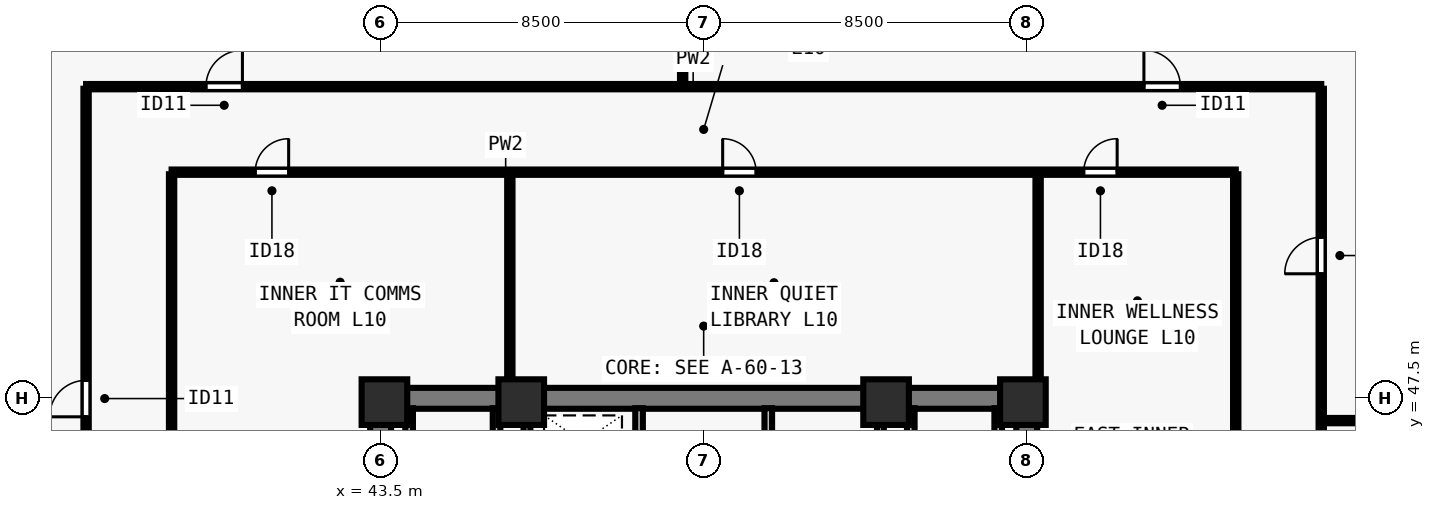
"""IFC4 building model, lengths in metres.
Left out: names, types, materials, properties, quantities, classifications, styles, units other than length and angle.
Written with IfcOpenShell. Run it as: python <this file> out.ifc"""

import sys

from ifc_helpers import new_model, si_unit, direction, frame, frame_2d, origin, origin_2d, place, context, subcontext, project, spatial, rectangle, extrude, element, fill, save


model = new_model("IFC4")
c1 = context("Model", 3, precision=1e-05, world=origin(), true_north=direction((0.0, 1.0)))
c2 = subcontext(c1, "Body", "Model", "MODEL_VIEW")
j1 = project(units=[si_unit("LENGTHUNIT", "METRE"), si_unit("PLANEANGLEUNIT", "RADIAN")], contexts=[c1])
p1 = place(None, origin())
s1 = spatial("IfcSite", under=j1, at=p1, CompositionType="ELEMENT")
p2 = place(p1, origin())
s2 = spatial("IfcBuilding", under=s1, at=p2, CompositionType="ELEMENT")
p3 = place(p2, frame((0.0, 0.0, 41.0)))
s3 = spatial("IfcBuildingStorey", under=s2, at=p3, CompositionType="ELEMENT", Elevation=41.0)
for number, where, z_axis, x_axis in (
    (1, (43.6, 47.4, 0.0), (0.0, 0.0, 1.0), (1.0, 0.0, 0.0)),
    (2, (47.2, 47.4, 0.0), (0.0, 0.0, 1.0), (1.0, 0.0, 0.0)),
    (3, (56.8, 47.4, 0.0), (0.0, 0.0, 1.0), (1.0, 0.0, 0.0)),
    (4, (60.4, 47.4, 0.0), (0.0, 0.0, 1.0), (1.0, 0.0, 0.0)),
):
    element("IfcColumn", number, at=place(p3, frame(where, z_axis=z_axis, x_axis=x_axis)), inside=s3, PredefinedType="COLUMN", context=c2, shape_type="SweptSolid", body=[
        extrude(rectangle(XDim=1.2, YDim=1.2, at=origin_2d()), origin(), (0.0, 0.0, 1.0), 3.5),
    ])
p4 = place(p3, frame((43.225, 47.5, 0.0), z_axis=(0.0, 0.0, 1.0), x_axis=(1.0, 0.0, 0.0)))
e5 = element("IfcWall", 5, at=p4, inside=s3, PredefinedType="SHEAR", context=c2, shape_type="SweptSolid", body=[
    extrude(rectangle(XDim=17.55, YDim=0.55, at=frame_2d((8.775, 0.0))), origin(), (0.0, 0.0, 1.0), 3.28),
])
for number, where, z_axis, x_axis in (
    (6, (43.5, 40.8, 0.0), (0.0, 0.0, 1.0), (0.0, 1.0, 0.0)),
    (7, (60.5, 40.8, 0.0), (0.0, 0.0, 1.0), (0.0, 1.0, 0.0)),
):
    element("IfcWall", number, at=place(p3, frame(where, z_axis=z_axis, x_axis=x_axis)), inside=s3, PredefinedType="SHEAR", context=c2, shape_type="SweptSolid", body=[
        extrude(rectangle(XDim=6.435, YDim=0.55, at=frame_2d((3.218, 0.0))), origin(), (0.0, 0.0, 1.0), 3.28),
    ])
p5 = place(p3, frame((50.3, 40.585, 0.0), z_axis=(0.0, 0.0, 1.0), x_axis=(0.0, 1.0, 0.0)))
e8 = element("IfcWall", 8, at=p5, inside=s3, PredefinedType="SOLIDWALL", context=c2, shape_type="SweptSolid", body=[
    extrude(rectangle(XDim=6.655, YDim=0.2, at=frame_2d((3.328, 0.0))), origin(), (0.0, 0.0, 1.0), 3.28),
])
p6 = place(p5, frame((5.065, 0.0, 0.0)))
e9 = element("IfcOpeningElement", 9, at=p6, cuts=e8, PredefinedType="OPENING", context=c2, shape_type="SweptSolid", body=[
    extrude(rectangle(XDim=0.8, YDim=2.08, at=frame_2d((0.4, 1.04))), frame((0.0, 0.11, 0.0), z_axis=(0.0, -1.0, 0.0), x_axis=(1.0, 0.0, 0.0)), (0.0, 0.0, 1.0), 0.22),
])
p7 = place(p3, frame((53.7, 40.585, 0.0), z_axis=(0.0, 0.0, 1.0), x_axis=(0.0, 1.0, 0.0)))
e10 = element("IfcWall", 10, at=p7, inside=s3, PredefinedType="SOLIDWALL", context=c2, shape_type="SweptSolid", body=[
    extrude(rectangle(XDim=6.655, YDim=0.2, at=frame_2d((3.328, 0.0))), origin(), (0.0, 0.0, 1.0), 3.28),
])
p8 = place(p7, frame((0.195, 0.0, 0.0)))
e11 = element("IfcOpeningElement", 11, at=p8, cuts=e10, PredefinedType="OPENING", context=c2, shape_type="SweptSolid", body=[
    extrude(rectangle(XDim=0.8, YDim=2.08, at=frame_2d((0.4, 1.04))), frame((0.0, 0.11, 0.0), z_axis=(0.0, -1.0, 0.0), x_axis=(1.0, 0.0, 0.0)), (0.0, 0.0, 1.0), 0.22),
])
p9 = place(p7, frame((4.265, 0.0, 0.0)))
e12 = element("IfcOpeningElement", 12, at=p9, cuts=e10, PredefinedType="OPENING", context=c2, shape_type="SweptSolid", body=[
    extrude(rectangle(XDim=0.95, YDim=2.12, at=frame_2d((0.475, 1.06))), frame((0.0, 0.11, 0.0), z_axis=(0.0, -1.0, 0.0), x_axis=(1.0, 0.0, 0.0)), (0.0, 0.0, 1.0), 0.22),
])
for number, where, z_axis, x_axis in (
    (13, (46.55, 43.735, 0.0), (0.0, 0.0, 1.0), (0.0, 1.0, 0.0)),
    (14, (44.25, 43.735, 0.0), (0.0, 0.0, 1.0), (0.0, 1.0, 0.0)),
    (15, (57.45, 43.735, 0.0), (0.0, 0.0, 1.0), (0.0, 1.0, 0.0)),
    (16, (59.75, 43.735, 0.0), (0.0, 0.0, 1.0), (0.0, 1.0, 0.0)),
):
    element("IfcWall", number, at=place(p3, frame(where, z_axis=z_axis, x_axis=x_axis)), inside=s3, PredefinedType="SOLIDWALL", context=c2, shape_type="SweptSolid", body=[
        extrude(rectangle(XDim=3.505, YDim=0.2, at=frame_2d((1.752, 0.0))), origin(), (0.0, 0.0, 1.0), 3.28),
    ])
for number, where, z_axis, x_axis in (
    (17, (47.35, 43.735, 0.0), (0.0, 0.0, 1.0), (0.0, 1.0, 0.0)),
    (18, (56.65, 43.735, 0.0), (0.0, 0.0, 1.0), (0.0, 1.0, 0.0)),
):
    element("IfcWall", number, at=place(p3, frame(where, z_axis=z_axis, x_axis=x_axis)), inside=s3, PredefinedType="SOLIDWALL", context=c2, shape_type="SweptSolid", body=[
        extrude(rectangle(XDim=3.505, YDim=0.18, at=frame_2d((1.752, 0.0))), origin(), (0.0, 0.0, 1.0), 3.28),
    ])
p10 = place(p3, frame((35.75, 55.7, 0.0), z_axis=(0.0, 0.0, 1.0), x_axis=(1.0, 0.0, 0.0)))
e19 = element("IfcWall", 19, at=p10, inside=s3, PredefinedType="PARTITIONING", context=c2, shape_type="SweptSolid", body=[
    extrude(rectangle(XDim=32.5, YDim=0.14, at=frame_2d((16.25, 0.0))), origin(), (0.0, 0.0, 1.0), 3.28),
])
p11 = place(p10, frame((3.154, 0.0, 0.0)))
e20 = element("IfcOpeningElement", 20, at=p11, cuts=e19, PredefinedType="OPENING", context=c2, shape_type="SweptSolid", body=[
    extrude(rectangle(XDim=0.96, YDim=2.12, at=frame_2d((0.48, 1.06))), frame((0.0, 0.08, 0.0), z_axis=(0.0, -1.0, 0.0), x_axis=(1.0, 0.0, 0.0)), (0.0, 0.0, 1.0), 0.16),
])
p12 = place(p10, frame((27.834, 0.0, 0.0)))
e21 = element("IfcOpeningElement", 21, at=p12, cuts=e19, PredefinedType="OPENING", context=c2, shape_type="SweptSolid", body=[
    extrude(rectangle(XDim=0.96, YDim=2.12, at=frame_2d((0.48, 1.06))), frame((0.0, 0.08, 0.0), z_axis=(0.0, -1.0, 0.0), x_axis=(1.0, 0.0, 0.0)), (0.0, 0.0, 1.0), 0.16),
])
p13 = place(p3, frame((35.75, 22.355, 0.0), z_axis=(0.0, 0.0, 1.0), x_axis=(0.0, 1.0, 0.0)))
e22 = element("IfcWall", 22, at=p13, inside=s3, PredefinedType="PARTITIONING", context=c2, shape_type="SweptSolid", body=[
    extrude(rectangle(XDim=33.29, YDim=0.14, at=frame_2d((16.645, 0.0))), origin(), (0.0, 0.0, 1.0), 3.28),
])
p14 = place(p13, frame((8.058, 0.0, 0.0)))
e23 = element("IfcOpeningElement", 23, at=p14, cuts=e22, PredefinedType="OPENING", context=c2, shape_type="SweptSolid", body=[
    extrude(rectangle(XDim=0.96, YDim=2.12, at=frame_2d((0.48, 1.06))), frame((0.0, 0.08, 0.0), z_axis=(0.0, -1.0, 0.0), x_axis=(1.0, 0.0, 0.0)), (0.0, 0.0, 1.0), 0.16),
])
p15 = place(p13, frame((24.658, 0.0, 0.0)))
e24 = element("IfcOpeningElement", 24, at=p15, cuts=e22, PredefinedType="OPENING", context=c2, shape_type="SweptSolid", body=[
    extrude(rectangle(XDim=0.96, YDim=2.12, at=frame_2d((0.48, 1.06))), frame((0.0, 0.08, 0.0), z_axis=(0.0, -1.0, 0.0), x_axis=(1.0, 0.0, 0.0)), (0.0, 0.0, 1.0), 0.16),
])
p16 = place(p3, frame((68.25, 22.355, 0.0), z_axis=(0.0, 0.0, 1.0), x_axis=(0.0, 1.0, 0.0)))
e25 = element("IfcWall", 25, at=p16, inside=s3, PredefinedType="PARTITIONING", context=c2, shape_type="SweptSolid", body=[
    extrude(rectangle(XDim=33.29, YDim=0.14, at=frame_2d((16.645, 0.0))), origin(), (0.0, 0.0, 1.0), 3.28),
])
p17 = place(p16, frame((3.522, 0.0, 0.0)))
e26 = element("IfcOpeningElement", 26, at=p17, cuts=e25, PredefinedType="OPENING", context=c2, shape_type="SweptSolid", body=[
    extrude(rectangle(XDim=0.96, YDim=2.12, at=frame_2d((0.48, 1.06))), frame((0.0, 0.08, 0.0), z_axis=(0.0, -1.0, 0.0), x_axis=(1.0, 0.0, 0.0)), (0.0, 0.0, 1.0), 0.16),
])
p18 = place(p16, frame((11.956, 0.0, 0.0)))
e27 = element("IfcOpeningElement", 27, at=p18, cuts=e25, PredefinedType="OPENING", context=c2, shape_type="SweptSolid", body=[
    extrude(rectangle(XDim=0.96, YDim=2.12, at=frame_2d((0.48, 1.06))), frame((0.0, 0.08, 0.0), z_axis=(0.0, -1.0, 0.0), x_axis=(1.0, 0.0, 0.0)), (0.0, 0.0, 1.0), 0.16),
])
p19 = place(p16, frame((20.256, 0.0, 0.0)))
e28 = element("IfcOpeningElement", 28, at=p19, cuts=e25, PredefinedType="OPENING", context=c2, shape_type="SweptSolid", body=[
    extrude(rectangle(XDim=0.96, YDim=2.12, at=frame_2d((0.48, 1.06))), frame((0.0, 0.08, 0.0), z_axis=(0.0, -1.0, 0.0), x_axis=(1.0, 0.0, 0.0)), (0.0, 0.0, 1.0), 0.16),
])
p20 = place(p16, frame((28.422, 0.0, 0.0)))
e29 = element("IfcOpeningElement", 29, at=p20, cuts=e25, PredefinedType="OPENING", context=c2, shape_type="SweptSolid", body=[
    extrude(rectangle(XDim=0.96, YDim=2.12, at=frame_2d((0.48, 1.06))), frame((0.0, 0.08, 0.0), z_axis=(0.0, -1.0, 0.0), x_axis=(1.0, 0.0, 0.0)), (0.0, 0.0, 1.0), 0.16),
])
p21 = place(p3, frame((38.0, 53.45, 0.0), z_axis=(0.0, 0.0, 1.0), x_axis=(1.0, 0.0, 0.0)))
e30 = element("IfcWall", 30, at=p21, inside=s3, PredefinedType="PARTITIONING", context=c2, shape_type="SweptSolid", body=[
    extrude(rectangle(XDim=28.0, YDim=0.14, at=frame_2d((14.0, 0.0))), origin(), (0.0, 0.0, 1.0), 3.28),
])
p22 = place(p21, frame((2.2, 0.0, 0.0)))
e31 = element("IfcOpeningElement", 31, at=p22, cuts=e30, PredefinedType="OPENING", context=c2, shape_type="SweptSolid", body=[
    extrude(rectangle(XDim=0.88, YDim=2.1, at=frame_2d((0.44, 1.05))), frame((0.0, 0.08, 0.0), z_axis=(0.0, -1.0, 0.0), x_axis=(1.0, 0.0, 0.0)), (0.0, 0.0, 1.0), 0.16),
])
p23 = place(p21, frame((14.5, 0.0, 0.0)))
e32 = element("IfcOpeningElement", 32, at=p23, cuts=e30, PredefinedType="OPENING", context=c2, shape_type="SweptSolid", body=[
    extrude(rectangle(XDim=0.88, YDim=2.1, at=frame_2d((0.44, 1.05))), frame((0.0, 0.08, 0.0), z_axis=(0.0, -1.0, 0.0), x_axis=(1.0, 0.0, 0.0)), (0.0, 0.0, 1.0), 0.16),
])
p24 = place(p21, frame((24.0, 0.0, 0.0)))
e33 = element("IfcOpeningElement", 33, at=p24, cuts=e30, PredefinedType="OPENING", context=c2, shape_type="SweptSolid", body=[
    extrude(rectangle(XDim=0.88, YDim=2.1, at=frame_2d((0.44, 1.05))), frame((0.0, 0.08, 0.0), z_axis=(0.0, -1.0, 0.0), x_axis=(1.0, 0.0, 0.0)), (0.0, 0.0, 1.0), 0.16),
])
p25 = place(p3, frame((38.0, 40.8, 0.0), z_axis=(0.0, 0.0, 1.0), x_axis=(0.0, 1.0, 0.0)))
e34 = element("IfcWall", 34, at=p25, inside=s3, PredefinedType="PARTITIONING", context=c2, shape_type="SweptSolid", body=[
    extrude(rectangle(XDim=12.595, YDim=0.14, at=frame_2d((6.297, 0.0))), origin(), (0.0, 0.0, 1.0), 3.28),
])
p26 = place(p25, frame((2.5, 0.0, 0.0)))
e35 = element("IfcOpeningElement", 35, at=p26, cuts=e34, PredefinedType="OPENING", context=c2, shape_type="SweptSolid", body=[
    extrude(rectangle(XDim=0.88, YDim=2.1, at=frame_2d((0.44, 1.05))), frame((0.0, 0.08, 0.0), z_axis=(0.0, -1.0, 0.0), x_axis=(1.0, 0.0, 0.0)), (0.0, 0.0, 1.0), 0.16),
])
p27 = place(p3, frame((66.0, 40.8, 0.0), z_axis=(0.0, 0.0, 1.0), x_axis=(0.0, 1.0, 0.0)))
e36 = element("IfcWall", 36, at=p27, inside=s3, PredefinedType="PARTITIONING", context=c2, shape_type="SweptSolid", body=[
    extrude(rectangle(XDim=12.595, YDim=0.14, at=frame_2d((6.297, 0.0))), origin(), (0.0, 0.0, 1.0), 3.28),
])
p28 = place(p27, frame((2.5, 0.0, 0.0)))
e37 = element("IfcOpeningElement", 37, at=p28, cuts=e36, PredefinedType="OPENING", context=c2, shape_type="SweptSolid", body=[
    extrude(rectangle(XDim=0.88, YDim=2.1, at=frame_2d((0.44, 1.05))), frame((0.0, 0.08, 0.0), z_axis=(0.0, -1.0, 0.0), x_axis=(1.0, 0.0, 0.0)), (0.0, 0.0, 1.0), 0.16),
])
p29 = place(p3, frame((46.9, 47.76, 0.0), z_axis=(0.0, 0.0, 1.0), x_axis=(0.0, 1.0, 0.0)))
e38 = element("IfcWall", 38, at=p29, inside=s3, PredefinedType="PARTITIONING", context=c2, shape_type="SweptSolid", body=[
    extrude(rectangle(XDim=5.635, YDim=0.14, at=frame_2d((2.817, 0.0))), origin(), (0.0, 0.0, 1.0), 3.28),
])
p30 = place(p3, frame((60.8, 47.76, 0.0), z_axis=(0.0, 0.0, 1.0), x_axis=(0.0, 1.0, 0.0)))
e39 = element("IfcWall", 39, at=p30, inside=s3, PredefinedType="PARTITIONING", context=c2, shape_type="SweptSolid", body=[
    extrude(rectangle(XDim=5.635, YDim=0.14, at=frame_2d((2.817, 0.0))), origin(), (0.0, 0.0, 1.0), 2.439),
])
p31 = place(p3, frame((51.448, 55.8, 0.0), z_axis=(0.0, 0.0, 1.0), x_axis=(0.0, 1.0, 0.0)))
e40 = element("IfcWall", 40, at=p31, inside=s3, PredefinedType="PARTITIONING", context=c2, shape_type="SweptSolid", body=[
    extrude(rectangle(XDim=8.28, YDim=0.14, at=frame_2d((4.14, 0.0))), origin(), (0.0, 0.0, 1.0), 3.28),
])
p32 = place(p3, frame((68.35, 46.913, 0.0), z_axis=(0.0, 0.0, 1.0), x_axis=(1.0, 0.0, 0.0)))
e41 = element("IfcWall", 41, at=p32, inside=s3, PredefinedType="PARTITIONING", context=c2, shape_type="SweptSolid", body=[
    extrude(rectangle(XDim=8.73, YDim=0.14, at=frame_2d((4.365, 0.0))), origin(), (0.0, 0.0, 1.0), 3.28),
])
p33 = place(p22, origin())
e42 = element("IfcDoor", 42, at=p33, inside=s3, OperationType="SINGLE_SWING_RIGHT", PredefinedType="DOOR", context=c2, shape_type="SweptSolid", body=[
    extrude(rectangle(XDim=0.88, YDim=2.1, at=frame_2d((0.44, 1.05))), frame((0.0, 0.025, 0.0), z_axis=(0.0, -1.0, 0.0), x_axis=(1.0, 0.0, 0.0)), (0.0, 0.0, 1.0), 0.05),
])
fill(e31, e42)
p34 = place(p23, origin())
e43 = element("IfcDoor", 43, at=p34, inside=s3, OperationType="SINGLE_SWING_LEFT", PredefinedType="DOOR", context=c2, shape_type="SweptSolid", body=[
    extrude(rectangle(XDim=0.88, YDim=2.1, at=frame_2d((0.44, 1.05))), frame((0.0, 0.025, 0.0), z_axis=(0.0, -1.0, 0.0), x_axis=(1.0, 0.0, 0.0)), (0.0, 0.0, 1.0), 0.05),
])
fill(e32, e43)
p35 = place(p24, origin())
e44 = element("IfcDoor", 44, at=p35, inside=s3, OperationType="SINGLE_SWING_RIGHT", PredefinedType="DOOR", context=c2, shape_type="SweptSolid", body=[
    extrude(rectangle(XDim=0.88, YDim=2.1, at=frame_2d((0.44, 1.05))), frame((0.0, 0.025, 0.0), z_axis=(0.0, -1.0, 0.0), x_axis=(1.0, 0.0, 0.0)), (0.0, 0.0, 1.0), 0.05),
])
fill(e33, e44)
p36 = place(p11, origin())
e45 = element("IfcDoor", 45, at=p36, inside=s3, OperationType="SINGLE_SWING_RIGHT", PredefinedType="DOOR", context=c2, shape_type="SweptSolid", body=[
    extrude(rectangle(XDim=0.96, YDim=2.12, at=frame_2d((0.48, 1.06))), frame((0.0, 0.025, 0.0), z_axis=(0.0, -1.0, 0.0), x_axis=(1.0, 0.0, 0.0)), (0.0, 0.0, 1.0), 0.05),
])
fill(e20, e45)
p37 = place(p12, origin())
e46 = element("IfcDoor", 46, at=p37, inside=s3, OperationType="SINGLE_SWING_LEFT", PredefinedType="DOOR", context=c2, shape_type="SweptSolid", body=[
    extrude(rectangle(XDim=0.96, YDim=2.12, at=frame_2d((0.48, 1.06))), frame((0.0, 0.025, 0.0), z_axis=(0.0, -1.0, 0.0), x_axis=(1.0, 0.0, 0.0)), (0.0, 0.0, 1.0), 0.05),
])
fill(e21, e46)
p38 = place(p15, origin())
e47 = element("IfcDoor", 47, at=p38, inside=s3, OperationType="SINGLE_SWING_LEFT", PredefinedType="DOOR", context=c2, shape_type="SweptSolid", body=[
    extrude(rectangle(XDim=0.96, YDim=2.12, at=frame_2d((0.48, 1.06))), frame((0.0, 0.025, 0.0), z_axis=(0.0, -1.0, 0.0), x_axis=(1.0, 0.0, 0.0)), (0.0, 0.0, 1.0), 0.05),
])
fill(e24, e47)
p39 = place(p20, origin())
e48 = element("IfcDoor", 48, at=p39, inside=s3, OperationType="SINGLE_SWING_LEFT", PredefinedType="DOOR", context=c2, shape_type="SweptSolid", body=[
    extrude(rectangle(XDim=0.96, YDim=2.12, at=frame_2d((0.48, 1.06))), frame((0.0, 0.025, 0.0), z_axis=(0.0, -1.0, 0.0), x_axis=(1.0, 0.0, 0.0)), (0.0, 0.0, 1.0), 0.05),
])
fill(e29, e48)
save(model, sys.argv[1])
